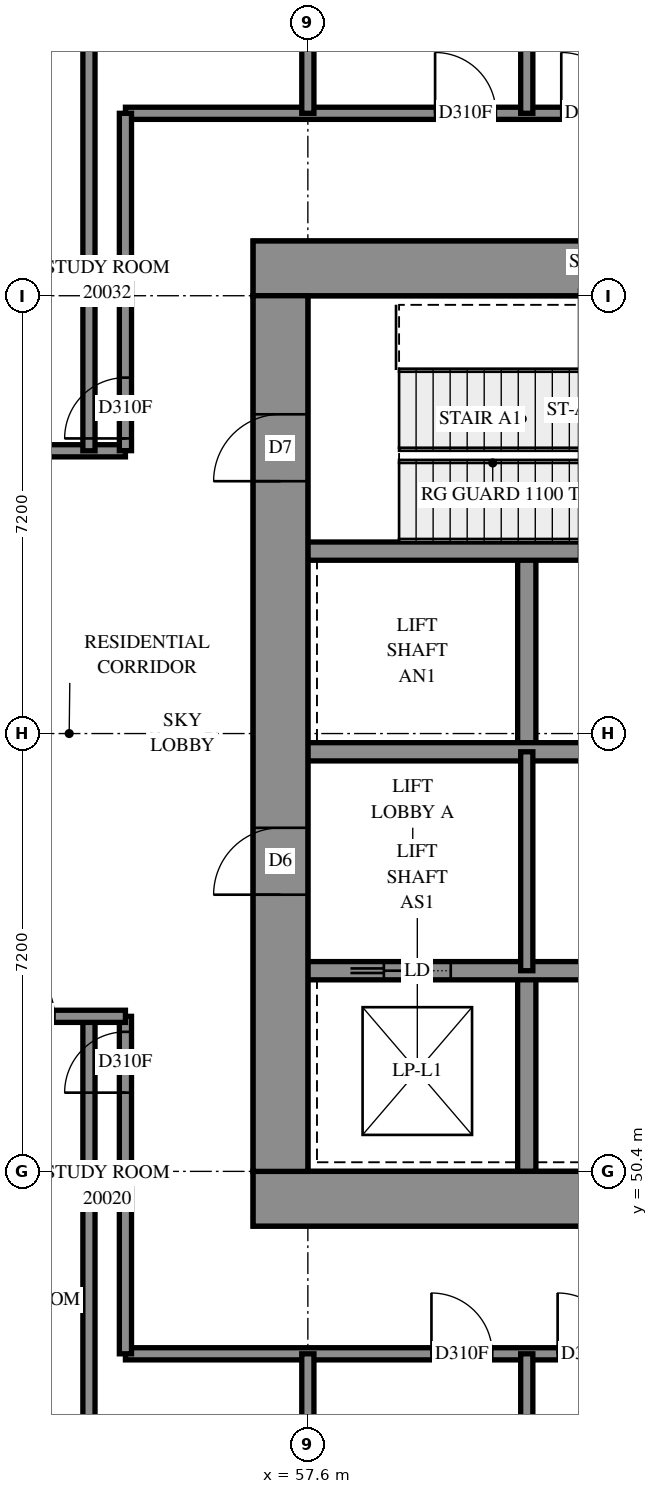
"""IFC4 building model, lengths in metres.
Left out: names, types, materials, properties, quantities, classifications, styles, units other than length and angle.
Written with IfcOpenShell. Run it as: python <this file> out.ifc"""

import sys

from ifc_helpers import new_model, si_unit, direction, frame, frame_2d, origin, place, context, subcontext, project, spatial, rectangle, extrude, element, fill, save


model = new_model("IFC4")
c1 = context("Model", 3, precision=1e-05, world=origin(), true_north=direction((0.0, 1.0)))
c2 = subcontext(c1, "Body", "Model", "MODEL_VIEW")
j1 = project(units=[si_unit("LENGTHUNIT", "METRE"), si_unit("PLANEANGLEUNIT", "RADIAN")], contexts=[c1])
p1 = place(None, origin())
s1 = spatial("IfcSite", under=j1, at=p1, CompositionType="ELEMENT")
p2 = place(p1, origin())
s2 = spatial("IfcBuilding", under=s1, at=p2, CompositionType="ELEMENT")
p3 = place(p2, frame((0.0, 0.0, 77.0)))
s3 = spatial("IfcBuildingStorey", under=s2, at=p3, CompositionType="ELEMENT", Elevation=77.0)
p4 = place(p3, frame((56.7, 49.95, -0.3), z_axis=(0.0, 0.0, 1.0), x_axis=(1.0, 0.0, 0.0)))
e1 = element("IfcWall", 1, at=p4, inside=s3, PredefinedType="SHEAR", context=c2, shape_type="SweptSolid", body=[
    extrude(rectangle(XDim=16.2, YDim=0.9, at=frame_2d((8.1, 0.0))), origin(), (0.0, 0.0, 1.0), 3.5),
])
p5 = place(p3, frame((56.7, 65.25, -0.3), z_axis=(0.0, 0.0, 1.0), x_axis=(1.0, 0.0, 0.0)))
e2 = element("IfcWall", 2, at=p5, inside=s3, PredefinedType="SHEAR", context=c2, shape_type="SweptSolid", body=[
    extrude(rectangle(XDim=16.2, YDim=0.9, at=frame_2d((8.1, 0.0))), origin(), (0.0, 0.0, 1.0), 3.5),
])
p6 = place(p5, frame((10.9, 0.0, 0.3)))
e3 = element("IfcOpeningElement", 3, at=p6, cuts=e2, PredefinedType="OPENING", context=c2, shape_type="SweptSolid", body=[
    extrude(rectangle(XDim=0.8, YDim=2.1, at=frame_2d((0.4, 1.05))), frame((0.0, 0.46, 0.0), z_axis=(0.0, -1.0, 0.0), x_axis=(1.0, 0.0, 0.0)), (0.0, 0.0, 1.0), 0.92),
])
p7 = place(p3, frame((57.15, 50.4, -0.3), z_axis=(0.0, 0.0, 1.0), x_axis=(0.0, 1.0, 0.0)))
e4 = element("IfcWall", 4, at=p7, inside=s3, PredefinedType="SHEAR", context=c2, shape_type="SweptSolid", body=[
    extrude(rectangle(XDim=14.4, YDim=0.9, at=frame_2d((7.2, 0.0))), origin(), (0.0, 0.0, 1.0), 3.5),
])
p8 = place(p7, frame((4.55, 0.0, 0.3)))
e5 = element("IfcOpeningElement", 5, at=p8, cuts=e4, PredefinedType="OPENING", context=c2, shape_type="SweptSolid", body=[
    extrude(rectangle(XDim=1.1, YDim=2.1, at=frame_2d((0.55, 1.05))), frame((0.0, 0.46, 0.0), z_axis=(0.0, -1.0, 0.0), x_axis=(1.0, 0.0, 0.0)), (0.0, 0.0, 1.0), 0.92),
])
p9 = place(p7, frame((11.35, 0.0, 0.3)))
e6 = element("IfcOpeningElement", 6, at=p9, cuts=e4, PredefinedType="OPENING", context=c2, shape_type="SweptSolid", body=[
    extrude(rectangle(XDim=1.1, YDim=2.1, at=frame_2d((0.55, 1.05))), frame((0.0, 0.46, 0.0), z_axis=(0.0, -1.0, 0.0), x_axis=(1.0, 0.0, 0.0)), (0.0, 0.0, 1.0), 0.92),
])
for number, where, z_axis, x_axis in (
    (7, (61.2, 50.4, 0.0), (0.0, 0.0, 1.0), (0.0, 1.0, 0.0)),
    (8, (61.2, 57.3, 0.0), (0.0, 0.0, 1.0), (0.0, 1.0, 0.0)),
):
    element("IfcWall", number, at=place(p3, frame(where, z_axis=z_axis, x_axis=x_axis)), inside=s3, PredefinedType="SOLIDWALL", context=c2, shape_type="SweptSolid", body=[
        extrude(rectangle(XDim=3.3, YDim=0.3, at=frame_2d((1.65, 0.0))), origin(), (0.0, 0.0, 1.0), 3.9),
    ])
p10 = place(p3, frame((57.6, 53.7, 0.0), z_axis=(0.0, 0.0, 1.0), x_axis=(1.0, 0.0, 0.0)))
e9 = element("IfcWall", 9, at=p10, inside=s3, PredefinedType="SOLIDWALL", context=c2, shape_type="SweptSolid", body=[
    extrude(rectangle(XDim=14.4, YDim=0.3, at=frame_2d((7.2, 0.0))), origin(), (0.0, 0.0, 1.0), 3.9),
])
p11 = place(p10, frame((1.25, 0.0, 0.0)))
e10 = element("IfcOpeningElement", 10, at=p11, cuts=e9, PredefinedType="OPENING", context=c2, shape_type="SweptSolid", body=[
    extrude(rectangle(XDim=1.1, YDim=2.1, at=frame_2d((0.55, 1.05))), frame((0.0, 0.16, 0.0), z_axis=(0.0, -1.0, 0.0), x_axis=(1.0, 0.0, 0.0)), (0.0, 0.0, 1.0), 0.32),
])
p12 = place(p10, frame((4.85, 0.0, 0.0)))
e11 = element("IfcOpeningElement", 11, at=p12, cuts=e9, PredefinedType="OPENING", context=c2, shape_type="SweptSolid", body=[
    extrude(rectangle(XDim=1.1, YDim=2.1, at=frame_2d((0.55, 1.05))), frame((0.0, 0.16, 0.0), z_axis=(0.0, -1.0, 0.0), x_axis=(1.0, 0.0, 0.0)), (0.0, 0.0, 1.0), 0.32),
])
p13 = place(p10, frame((8.45, 0.0, 0.0)))
e12 = element("IfcOpeningElement", 12, at=p13, cuts=e9, PredefinedType="OPENING", context=c2, shape_type="SweptSolid", body=[
    extrude(rectangle(XDim=1.1, YDim=2.1, at=frame_2d((0.55, 1.05))), frame((0.0, 0.16, 0.0), z_axis=(0.0, -1.0, 0.0), x_axis=(1.0, 0.0, 0.0)), (0.0, 0.0, 1.0), 0.32),
])
p14 = place(p10, frame((12.05, 0.0, 0.0)))
e13 = element("IfcOpeningElement", 13, at=p14, cuts=e9, PredefinedType="OPENING", context=c2, shape_type="SweptSolid", body=[
    extrude(rectangle(XDim=1.1, YDim=2.1, at=frame_2d((0.55, 1.05))), frame((0.0, 0.16, 0.0), z_axis=(0.0, -1.0, 0.0), x_axis=(1.0, 0.0, 0.0)), (0.0, 0.0, 1.0), 0.32),
])
p15 = place(p3, frame((57.6, 57.3, 0.0), z_axis=(0.0, 0.0, 1.0), x_axis=(1.0, 0.0, 0.0)))
e14 = element("IfcWall", 14, at=p15, inside=s3, PredefinedType="SOLIDWALL", context=c2, shape_type="SweptSolid", body=[
    extrude(rectangle(XDim=14.4, YDim=0.3, at=frame_2d((7.2, 0.0))), origin(), (0.0, 0.0, 1.0), 3.9),
])
p16 = place(p15, frame((12.05, 0.0, 0.0)))
e15 = element("IfcOpeningElement", 15, at=p16, cuts=e14, PredefinedType="OPENING", context=c2, shape_type="SweptSolid", body=[
    extrude(rectangle(XDim=1.1, YDim=2.1, at=frame_2d((0.55, 1.05))), frame((0.0, 0.16, 0.0), z_axis=(0.0, -1.0, 0.0), x_axis=(1.0, 0.0, 0.0)), (0.0, 0.0, 1.0), 0.32),
])
p17 = place(p3, frame((57.6, 60.6, 0.0), z_axis=(0.0, 0.0, 1.0), x_axis=(1.0, 0.0, 0.0)))
e16 = element("IfcWall", 16, at=p17, inside=s3, PredefinedType="SOLIDWALL", context=c2, shape_type="SweptSolid", body=[
    extrude(rectangle(XDim=7.2, YDim=0.3, at=frame_2d((3.6, 0.0))), origin(), (0.0, 0.0, 1.0), 3.9),
])
p18 = place(p3, frame((61.2, 53.7, 0.0), z_axis=(0.0, 0.0, 1.0), x_axis=(0.0, 1.0, 0.0)))
e17 = element("IfcWall", 17, at=p18, inside=s3, PredefinedType="PARTITIONING", context=c2, shape_type="SweptSolid", body=[
    extrude(rectangle(XDim=3.6, YDim=0.2, at=frame_2d((1.8, 0.0))), origin(), (0.0, 0.0, 1.0), 3.9),
])
p19 = place(p3, frame((33.452, 62.25, 0.0), z_axis=(0.0, 0.0, 1.0), x_axis=(1.0, 0.0, 0.0)))
e18 = element("IfcWall", 18, at=p19, inside=s3, PredefinedType="PARTITIONING", context=c2, shape_type="SweptSolid", body=[
    extrude(rectangle(XDim=21.148, YDim=0.2, at=frame_2d((10.574, 0.0))), origin(), (0.0, 0.0, 1.0), 3.9),
])
p20 = place(p19, frame((6.106, 0.0, 0.0)))
e19 = element("IfcOpeningElement", 19, at=p20, cuts=e18, PredefinedType="OPENING", context=c2, shape_type="SweptSolid", body=[
    extrude(rectangle(XDim=1.0, YDim=2.1, at=frame_2d((0.5, 1.05))), frame((0.0, 0.11, 0.0), z_axis=(0.0, -1.0, 0.0), x_axis=(1.0, 0.0, 0.0)), (0.0, 0.0, 1.0), 0.22),
])
p21 = place(p19, frame((13.306, 0.0, 0.0)))
e20 = element("IfcOpeningElement", 20, at=p21, cuts=e18, PredefinedType="OPENING", context=c2, shape_type="SweptSolid", body=[
    extrude(rectangle(XDim=1.0, YDim=2.1, at=frame_2d((0.5, 1.05))), frame((0.0, 0.11, 0.0), z_axis=(0.0, -1.0, 0.0), x_axis=(1.0, 0.0, 0.0)), (0.0, 0.0, 1.0), 0.22),
])
p22 = place(p19, frame((18.713, 0.0, 0.0)))
e21 = element("IfcOpeningElement", 21, at=p22, cuts=e18, PredefinedType="OPENING", context=c2, shape_type="SweptSolid", body=[
    extrude(rectangle(XDim=1.0, YDim=2.1, at=frame_2d((0.5, 1.05))), frame((0.0, 0.11, 0.0), z_axis=(0.0, -1.0, 0.0), x_axis=(1.0, 0.0, 0.0)), (0.0, 0.0, 1.0), 0.22),
])
p23 = place(p3, frame((54.6, 67.8, 0.0), z_axis=(0.0, 0.0, 1.0), x_axis=(1.0, 0.0, 0.0)))
e22 = element("IfcWall", 22, at=p23, inside=s3, PredefinedType="PARTITIONING", context=c2, shape_type="SweptSolid", body=[
    extrude(rectangle(XDim=20.4, YDim=0.2, at=frame_2d((10.2, 0.0))), origin(), (0.0, 0.0, 1.0), 3.9),
])
p24 = place(p23, frame((19.257, 0.0, 0.0)))
e23 = element("IfcOpeningElement", 23, at=p24, cuts=e22, PredefinedType="OPENING", context=c2, shape_type="SweptSolid", body=[
    extrude(rectangle(XDim=1.0, YDim=2.1, at=frame_2d((0.5, 1.05))), frame((0.0, 0.11, 0.0), z_axis=(0.0, -1.0, 0.0), x_axis=(1.0, 0.0, 0.0)), (0.0, 0.0, 1.0), 0.22),
])
p25 = place(p23, frame((5.093, 0.0, 0.0)))
e24 = element("IfcOpeningElement", 24, at=p25, cuts=e22, PredefinedType="OPENING", context=c2, shape_type="SweptSolid", body=[
    extrude(rectangle(XDim=1.0, YDim=2.1, at=frame_2d((0.5, 1.05))), frame((0.0, 0.11, 0.0), z_axis=(0.0, -1.0, 0.0), x_axis=(1.0, 0.0, 0.0)), (0.0, 0.0, 1.0), 0.22),
])
p26 = place(p23, frame((7.168, 0.0, 0.0)))
e25 = element("IfcOpeningElement", 25, at=p26, cuts=e22, PredefinedType="OPENING", context=c2, shape_type="SweptSolid", body=[
    extrude(rectangle(XDim=1.0, YDim=2.1, at=frame_2d((0.5, 1.05))), frame((0.0, 0.11, 0.0), z_axis=(0.0, -1.0, 0.0), x_axis=(1.0, 0.0, 0.0)), (0.0, 0.0, 1.0), 0.22),
])
p27 = place(p23, frame((12.293, 0.0, 0.0)))
e26 = element("IfcOpeningElement", 26, at=p27, cuts=e22, PredefinedType="OPENING", context=c2, shape_type="SweptSolid", body=[
    extrude(rectangle(XDim=1.0, YDim=2.1, at=frame_2d((0.5, 1.05))), frame((0.0, 0.11, 0.0), z_axis=(0.0, -1.0, 0.0), x_axis=(1.0, 0.0, 0.0)), (0.0, 0.0, 1.0), 0.22),
])
p28 = place(p23, frame((14.367, 0.0, 0.0)))
e27 = element("IfcOpeningElement", 27, at=p28, cuts=e22, PredefinedType="OPENING", context=c2, shape_type="SweptSolid", body=[
    extrude(rectangle(XDim=1.0, YDim=2.1, at=frame_2d((0.5, 1.05))), frame((0.0, 0.11, 0.0), z_axis=(0.0, -1.0, 0.0), x_axis=(1.0, 0.0, 0.0)), (0.0, 0.0, 1.0), 0.22),
])
p29 = place(p3, frame((54.6, 47.4, 0.0), z_axis=(0.0, 0.0, 1.0), x_axis=(1.0, 0.0, 0.0)))
e28 = element("IfcWall", 28, at=p29, inside=s3, PredefinedType="PARTITIONING", context=c2, shape_type="SweptSolid", body=[
    extrude(rectangle(XDim=19.502, YDim=0.2, at=frame_2d((9.751, 0.0))), origin(), (0.0, 0.0, 1.0), 3.9),
])
p30 = place(p29, frame((5.032, 0.0, 0.0)))
e29 = element("IfcOpeningElement", 29, at=p30, cuts=e28, PredefinedType="OPENING", context=c2, shape_type="SweptSolid", body=[
    extrude(rectangle(XDim=1.0, YDim=2.1, at=frame_2d((0.5, 1.05))), frame((0.0, 0.11, 0.0), z_axis=(0.0, -1.0, 0.0), x_axis=(1.0, 0.0, 0.0)), (0.0, 0.0, 1.0), 0.22),
])
p31 = place(p29, frame((7.107, 0.0, 0.0)))
e30 = element("IfcOpeningElement", 30, at=p31, cuts=e28, PredefinedType="OPENING", context=c2, shape_type="SweptSolid", body=[
    extrude(rectangle(XDim=1.0, YDim=2.1, at=frame_2d((0.5, 1.05))), frame((0.0, 0.11, 0.0), z_axis=(0.0, -1.0, 0.0), x_axis=(1.0, 0.0, 0.0)), (0.0, 0.0, 1.0), 0.22),
])
p32 = place(p29, frame((12.232, 0.0, 0.0)))
e31 = element("IfcOpeningElement", 31, at=p32, cuts=e28, PredefinedType="OPENING", context=c2, shape_type="SweptSolid", body=[
    extrude(rectangle(XDim=1.0, YDim=2.1, at=frame_2d((0.5, 1.05))), frame((0.0, 0.11, 0.0), z_axis=(0.0, -1.0, 0.0), x_axis=(1.0, 0.0, 0.0)), (0.0, 0.0, 1.0), 0.22),
])
p33 = place(p29, frame((14.307, 0.0, 0.0)))
e32 = element("IfcOpeningElement", 32, at=p33, cuts=e28, PredefinedType="OPENING", context=c2, shape_type="SweptSolid", body=[
    extrude(rectangle(XDim=1.0, YDim=2.1, at=frame_2d((0.5, 1.05))), frame((0.0, 0.11, 0.0), z_axis=(0.0, -1.0, 0.0), x_axis=(1.0, 0.0, 0.0)), (0.0, 0.0, 1.0), 0.22),
])
for number, where, z_axis, x_axis in (
    (33, (54.0, 44.53, 0.0), (0.0, 0.0, 1.0), (0.0, 1.0, 0.0)),
    (34, (54.0, 62.25, 0.0), (0.0, 0.0, 1.0), (0.0, 1.0, 0.0)),
):
    element("IfcWall", number, at=place(p3, frame(where, z_axis=z_axis, x_axis=x_axis)), inside=s3, PredefinedType="PARTITIONING", context=c2, shape_type="SweptSolid", body=[
        extrude(rectangle(XDim=8.42, YDim=0.2, at=frame_2d((4.21, 0.0))), origin(), (0.0, 0.0, 1.0), 3.9),
    ])
p34 = place(p3, frame((54.6, 47.4, 0.0), z_axis=(0.0, 0.0, 1.0), x_axis=(0.0, 1.0, 0.0)))
e35 = element("IfcWall", 35, at=p34, inside=s3, PredefinedType="PARTITIONING", context=c2, shape_type="SweptSolid", body=[
    extrude(rectangle(XDim=5.55, YDim=0.2, at=frame_2d((2.775, 0.0))), origin(), (0.0, 0.0, 1.0), 3.9),
])
p35 = place(p34, frame((4.295, 0.0, 0.0)))
e36 = element("IfcOpeningElement", 36, at=p35, cuts=e35, PredefinedType="OPENING", context=c2, shape_type="SweptSolid", body=[
    extrude(rectangle(XDim=1.0, YDim=2.1, at=frame_2d((0.5, 1.05))), frame((0.0, 0.11, 0.0), z_axis=(0.0, -1.0, 0.0), x_axis=(1.0, 0.0, 0.0)), (0.0, 0.0, 1.0), 0.22),
])
p36 = place(p3, frame((54.6, 62.252, 0.0), z_axis=(0.0, 0.0, 1.0), x_axis=(0.0, 1.0, 0.0)))
e37 = element("IfcWall", 37, at=p36, inside=s3, PredefinedType="PARTITIONING", context=c2, shape_type="SweptSolid", body=[
    extrude(rectangle(XDim=5.548, YDim=0.2, at=frame_2d((2.774, 0.0))), origin(), (0.0, 0.0, 1.0), 3.9),
])
p37 = place(p36, frame((0.201, 0.0, 0.0)))
e38 = element("IfcOpeningElement", 38, at=p37, cuts=e37, PredefinedType="OPENING", context=c2, shape_type="SweptSolid", body=[
    extrude(rectangle(XDim=1.0, YDim=2.1, at=frame_2d((0.5, 1.05))), frame((0.0, 0.11, 0.0), z_axis=(0.0, -1.0, 0.0), x_axis=(1.0, 0.0, 0.0)), (0.0, 0.0, 1.0), 0.22),
])
p38 = place(p3, frame((50.4, 52.95, 0.0), z_axis=(0.0, 0.0, 1.0), x_axis=(1.0, 0.0, 0.0)))
e39 = element("IfcWall", 39, at=p38, inside=s3, PredefinedType="PARTITIONING", context=c2, shape_type="SweptSolid", body=[
    extrude(rectangle(XDim=4.2, YDim=0.2, at=frame_2d((2.1, 0.0))), origin(), (0.0, 0.0, 1.0), 3.9),
])
p39 = place(p38, frame((2.033, 0.0, 0.0)))
e40 = element("IfcOpeningElement", 40, at=p39, cuts=e39, PredefinedType="OPENING", context=c2, shape_type="SweptSolid", body=[
    extrude(rectangle(XDim=1.0, YDim=2.1, at=frame_2d((0.5, 1.05))), frame((0.0, 0.11, 0.0), z_axis=(0.0, -1.0, 0.0), x_axis=(1.0, 0.0, 0.0)), (0.0, 0.0, 1.0), 0.22),
])
for number, where, z_axis, x_axis in (
    (41, (57.6, 67.8, 0.0), (0.0, 0.0, 1.0), (0.0, 1.0, 0.0)),
    (42, (61.2, 67.8, 0.0), (0.0, 0.0, 1.0), (0.0, 1.0, 0.0)),
    (43, (57.6, 44.53, 0.0), (0.0, 0.0, 1.0), (0.0, 1.0, 0.0)),
    (44, (61.2, 44.53, 0.0), (0.0, 0.0, 1.0), (0.0, 1.0, 0.0)),
):
    element("IfcWall", number, at=place(p3, frame(where, z_axis=z_axis, x_axis=x_axis)), inside=s3, PredefinedType="PARTITIONING", context=c2, shape_type="SweptSolid", body=[
        extrude(rectangle(XDim=2.87, YDim=0.2, at=frame_2d((1.435, 0.0))), origin(), (0.0, 0.0, 1.0), 3.9),
    ])
p40 = place(p8, origin())
e45 = element("IfcDoor", 45, at=p40, inside=s3, OperationType="DOUBLE_DOOR_SINGLE_SWING", PredefinedType="DOOR", context=c2, shape_type="SweptSolid", body=[
    extrude(rectangle(XDim=1.1, YDim=2.1, at=frame_2d((0.55, 1.05))), frame((0.0, 0.025, 0.0), z_axis=(0.0, -1.0, 0.0), x_axis=(1.0, 0.0, 0.0)), (0.0, 0.0, 1.0), 0.05),
])
fill(e5, e45)
p41 = place(p9, origin())
e46 = element("IfcDoor", 46, at=p41, inside=s3, OperationType="SINGLE_SWING_LEFT", PredefinedType="DOOR", context=c2, shape_type="SweptSolid", body=[
    extrude(rectangle(XDim=1.1, YDim=2.1, at=frame_2d((0.55, 1.05))), frame((0.0, 0.025, 0.0), z_axis=(0.0, -1.0, 0.0), x_axis=(1.0, 0.0, 0.0)), (0.0, 0.0, 1.0), 0.05),
])
fill(e6, e46)
p42 = place(p11, origin())
e47 = element("IfcDoor", 47, at=p42, inside=s3, OperationType="SLIDING_TO_LEFT", PredefinedType="DOOR", context=c2, shape_type="SweptSolid", body=[
    extrude(rectangle(XDim=1.1, YDim=2.1, at=frame_2d((0.55, 1.05))), frame((0.0, 0.025, 0.0), z_axis=(0.0, -1.0, 0.0), x_axis=(1.0, 0.0, 0.0)), (0.0, 0.0, 1.0), 0.05),
])
fill(e10, e47)
p43 = place(p39, origin())
e48 = element("IfcDoor", 48, at=p43, inside=s3, OperationType="SINGLE_SWING_LEFT", PredefinedType="DOOR", context=c2, shape_type="SweptSolid", body=[
    extrude(rectangle(XDim=1.0, YDim=2.1, at=frame_2d((0.5, 1.05))), frame((0.0, 0.025, 0.0), z_axis=(0.0, -1.0, 0.0), x_axis=(1.0, 0.0, 0.0)), (0.0, 0.0, 1.0), 0.05),
])
fill(e40, e48)
p44 = place(p35, origin())
e49 = element("IfcDoor", 49, at=p44, inside=s3, OperationType="SINGLE_SWING_RIGHT", PredefinedType="DOOR", context=c2, shape_type="SweptSolid", body=[
    extrude(rectangle(XDim=1.0, YDim=2.1, at=frame_2d((0.5, 1.05))), frame((0.0, 0.025, 0.0), z_axis=(0.0, -1.0, 0.0), x_axis=(1.0, 0.0, 0.0)), (0.0, 0.0, 1.0), 0.05),
])
fill(e36, e49)
p45 = place(p30, origin())
e50 = element("IfcDoor", 50, at=p45, inside=s3, OperationType="SINGLE_SWING_LEFT", PredefinedType="DOOR", context=c2, shape_type="SweptSolid", body=[
    extrude(rectangle(XDim=1.0, YDim=2.1, at=frame_2d((0.5, 1.05))), frame((0.0, 0.025, 0.0), z_axis=(0.0, -1.0, 0.0), x_axis=(1.0, 0.0, 0.0)), (0.0, 0.0, 1.0), 0.05),
])
fill(e29, e50)
p46 = place(p31, origin())
e51 = element("IfcDoor", 51, at=p46, inside=s3, OperationType="SINGLE_SWING_RIGHT", PredefinedType="DOOR", context=c2, shape_type="SweptSolid", body=[
    extrude(rectangle(XDim=1.0, YDim=2.1, at=frame_2d((0.5, 1.05))), frame((0.0, 0.025, 0.0), z_axis=(0.0, -1.0, 0.0), x_axis=(1.0, 0.0, 0.0)), (0.0, 0.0, 1.0), 0.05),
])
fill(e30, e51)
p47 = place(p37, origin())
e52 = element("IfcDoor", 52, at=p47, inside=s3, OperationType="SINGLE_SWING_LEFT", PredefinedType="DOOR", context=c2, shape_type="SweptSolid", body=[
    extrude(rectangle(XDim=1.0, YDim=2.1, at=frame_2d((0.5, 1.05))), frame((0.0, 0.025, 0.0), z_axis=(0.0, -1.0, 0.0), x_axis=(1.0, 0.0, 0.0)), (0.0, 0.0, 1.0), 0.05),
])
fill(e38, e52)
p48 = place(p25, origin())
e53 = element("IfcDoor", 53, at=p48, inside=s3, OperationType="SINGLE_SWING_RIGHT", PredefinedType="DOOR", context=c2, shape_type="SweptSolid", body=[
    extrude(rectangle(XDim=1.0, YDim=2.1, at=frame_2d((0.5, 1.05))), frame((0.0, 0.025, 0.0), z_axis=(0.0, -1.0, 0.0), x_axis=(1.0, 0.0, 0.0)), (0.0, 0.0, 1.0), 0.05),
])
fill(e24, e53)
p49 = place(p26, origin())
e54 = element("IfcDoor", 54, at=p49, inside=s3, OperationType="SINGLE_SWING_LEFT", PredefinedType="DOOR", context=c2, shape_type="SweptSolid", body=[
    extrude(rectangle(XDim=1.0, YDim=2.1, at=frame_2d((0.5, 1.05))), frame((0.0, 0.025, 0.0), z_axis=(0.0, -1.0, 0.0), x_axis=(1.0, 0.0, 0.0)), (0.0, 0.0, 1.0), 0.05),
])
fill(e25, e54)
save(model, sys.argv[1])
